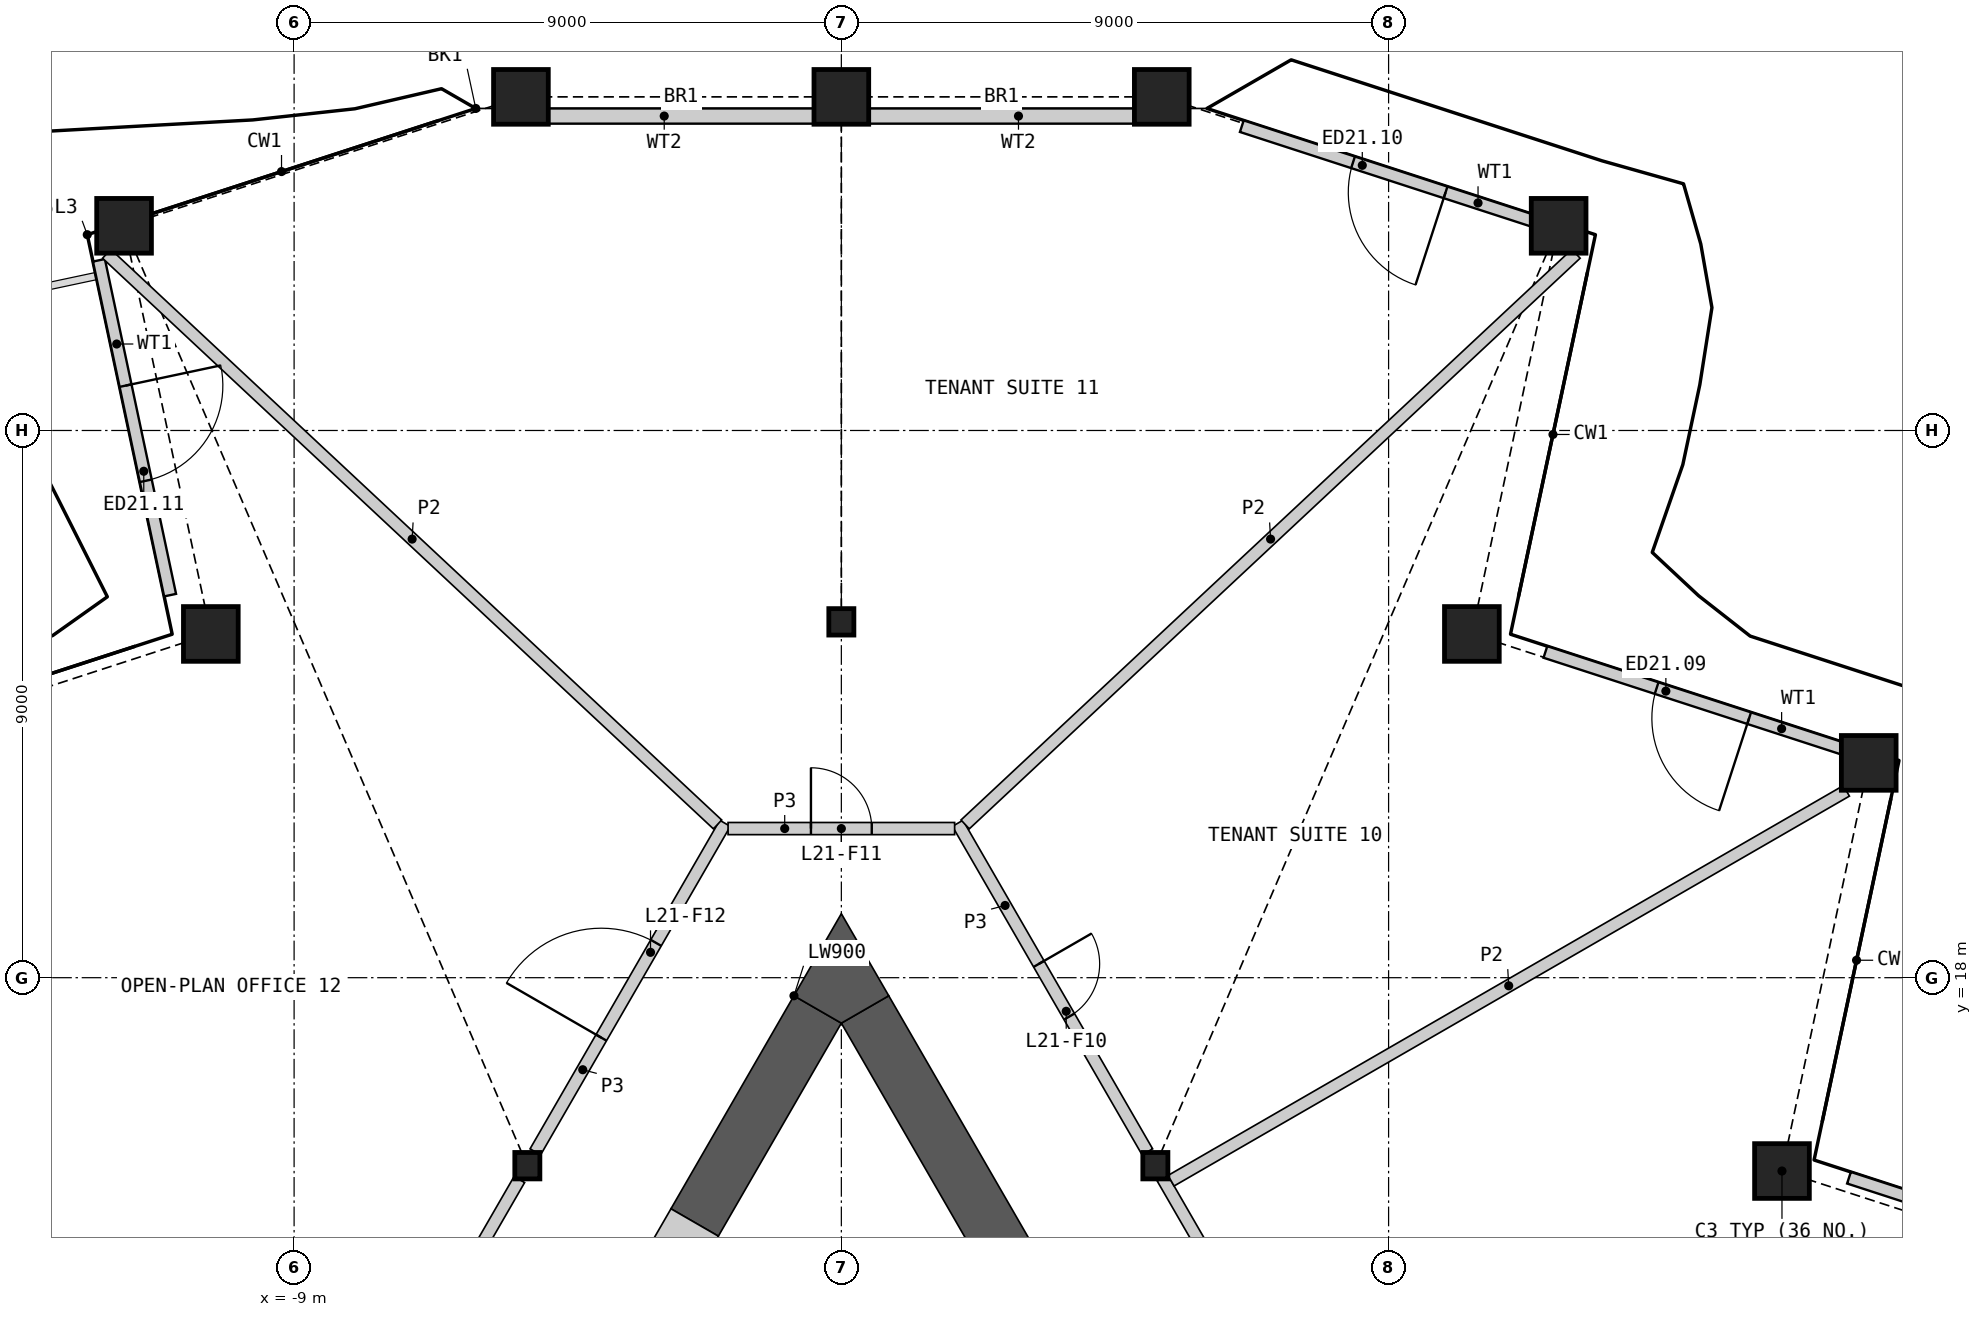
"""IFC4 building model, lengths in metres.
Left out: names, types, materials, properties, quantities, classifications, styles, units other than length and angle.
Written with IfcOpenShell. Run it as: python <this file> out.ifc"""

import sys

from ifc_helpers import new_model, si_unit, direction, frame, frame_2d, origin, origin_2d, place, context, subcontext, project, spatial, polyline, rectangle, hollow_rectangle, i_section, outline, extrude, element, fill, save


model = new_model("IFC4")
c1 = context("Model", 3, precision=1e-05, world=origin(), true_north=direction((0.0, 1.0)))
c2 = subcontext(c1, "Body", "Model", "MODEL_VIEW")
j1 = project(units=[si_unit("LENGTHUNIT", "METRE"), si_unit("PLANEANGLEUNIT", "RADIAN")], contexts=[c1])
p1 = place(None, origin())
s1 = spatial("IfcSite", under=j1, at=p1, CompositionType="ELEMENT")
p2 = place(p1, origin())
s2 = spatial("IfcBuilding", under=s1, at=p2, CompositionType="ELEMENT")
p3 = place(p2, frame((0.0, 0.0, 103.8)))
s3 = spatial("IfcBuildingStorey", under=s2, at=p3, CompositionType="ELEMENT", Elevation=103.8)
for number, where, z_axis, x_axis in (
    (1, (15.469, 14.82, 0.0), (0.0, 0.0, 1.0), (1.0, 0.0, 0.0)),
    (2, (16.896, 21.533, 0.0), (0.0, 0.0, 1.0), (1.0, 0.0, 0.0)),
    (3, (10.37, 23.654, 0.0), (0.0, 0.0, 1.0), (1.0, 0.0, 0.0)),
    (4, (11.796, 30.366, 0.0), (0.0, 0.0, 1.0), (1.0, 0.0, 0.0)),
    (5, (5.27, 32.487, 0.0), (0.0, 0.0, 1.0), (1.0, 0.0, 0.0)),
    (6, (0.0, 32.487, 0.0), (0.0, 0.0, 1.0), (1.0, 0.0, 0.0)),
    (7, (-5.27, 32.487, 0.0), (0.0, 0.0, 1.0), (1.0, 0.0, 0.0)),
    (8, (-11.796, 30.366, 0.0), (0.0, 0.0, 1.0), (1.0, 0.0, 0.0)),
    (9, (-10.37, 23.654, 0.0), (0.0, 0.0, 1.0), (1.0, 0.0, 0.0)),
):
    element("IfcColumn", number, at=place(p3, frame(where, z_axis=z_axis, x_axis=x_axis)), inside=s3, PredefinedType="COLUMN", context=c2, shape_type="SweptSolid", body=[
        extrude(hollow_rectangle(XDim=0.9, YDim=0.9, WallThickness=0.06, at=origin_2d()), origin(), (0.0, 0.0, 1.0), 4.2),
    ])
for number, where, z_axis, x_axis in (
    (10, (0.0, 23.853, 0.0), (0.0, 0.0, 1.0), (1.0, 0.0, 0.0)),
    (11, (-5.164, 14.908, 0.0), (0.0, 0.0, 1.0), (1.0, 0.0, 0.0)),
    (12, (5.164, 14.908, 0.0), (0.0, 0.0, 1.0), (1.0, 0.0, 0.0)),
):
    element("IfcColumn", number, at=place(p3, frame(where, z_axis=z_axis, x_axis=x_axis)), inside=s3, PredefinedType="COLUMN", context=c2, shape_type="SweptSolid", body=[
        extrude(i_section(OverallWidth=0.412, OverallDepth=0.435, WebThickness=0.036, FlangeThickness=0.057, at=origin_2d()), origin(), (0.0, 0.0, 1.0), 4.2),
    ])
p4 = place(p3, frame((21.751, 13.027, 0.0), z_axis=(0.0, 0.0, 1.0), x_axis=(-0.951049879841, 0.309037418534, 0.0)))
e13 = element("IfcWall", 13, at=p4, inside=s3, PredefinedType="SOLIDWALL", context=c2, shape_type="SweptSolid", body=[
    extrude(rectangle(XDim=5.446, YDim=0.2, at=frame_2d((2.723, 0.0))), origin(), (0.0, 0.0, 1.0), 3.189),
])
p5 = place(p4, frame((1.923, 0.0, 0.0)))
e14 = element("IfcOpeningElement", 14, at=p5, cuts=e13, PredefinedType="OPENING", context=c2, shape_type="SweptSolid", body=[
    extrude(rectangle(XDim=1.6, YDim=2.4, at=frame_2d((0.8, 1.2))), frame((0.0, 0.11, 0.0), z_axis=(0.0, -1.0, 0.0), x_axis=(1.0, 0.0, 0.0)), (0.0, 0.0, 1.0), 0.22),
])
p6 = place(p3, frame((16.759, 21.674, 0.0), z_axis=(0.0, 0.0, 1.0), x_axis=(-0.951049879841, 0.309037418534, 0.0)))
e15 = element("IfcWall", 15, at=p6, inside=s3, PredefinedType="SOLIDWALL", context=c2, shape_type="SweptSolid", body=[
    extrude(rectangle(XDim=5.446, YDim=0.2, at=frame_2d((2.723, 0.0))), origin(), (0.0, 0.0, 1.0), 3.189),
])
p7 = place(p6, frame((1.923, 0.0, 0.0)))
e16 = element("IfcOpeningElement", 16, at=p7, cuts=e15, PredefinedType="OPENING", context=c2, shape_type="SweptSolid", body=[
    extrude(rectangle(XDim=1.6, YDim=2.4, at=frame_2d((0.8, 1.2))), frame((0.0, 0.11, 0.0), z_axis=(0.0, -1.0, 0.0), x_axis=(1.0, 0.0, 0.0)), (0.0, 0.0, 1.0), 0.22),
])
p8 = place(p3, frame((11.766, 30.322, 0.0), z_axis=(0.0, 0.0, 1.0), x_axis=(-0.951049879841, 0.309037418534, 0.0)))
e17 = element("IfcWall", 17, at=p8, inside=s3, PredefinedType="SOLIDWALL", context=c2, shape_type="SweptSolid", body=[
    extrude(rectangle(XDim=5.446, YDim=0.2, at=frame_2d((2.723, 0.0))), origin(), (0.0, 0.0, 1.0), 3.189),
])
p9 = place(p8, frame((1.923, 0.0, 0.0)))
e18 = element("IfcOpeningElement", 18, at=p9, cuts=e17, PredefinedType="OPENING", context=c2, shape_type="SweptSolid", body=[
    extrude(rectangle(XDim=1.6, YDim=2.4, at=frame_2d((0.8, 1.2))), frame((0.0, 0.11, 0.0), z_axis=(0.0, -1.0, 0.0), x_axis=(1.0, 0.0, 0.0)), (0.0, 0.0, 1.0), 0.22),
])
for number, where, z_axis, x_axis in (
    (19, (5.376, 32.171, 0.0), (0.0, 0.0, 1.0), (-1.0, 0.0, 0.0)),
    (20, (-0.45, 32.171, 0.0), (0.0, 0.0, 1.0), (-1.0, 0.0, 0.0)),
):
    element("IfcWall", number, at=place(p3, frame(where, z_axis=z_axis, x_axis=x_axis)), inside=s3, PredefinedType="SOLIDWALL", context=c2, shape_type="SweptSolid", body=[
        extrude(rectangle(XDim=4.926, YDim=0.25, at=frame_2d((2.463, 0.0))), origin(), (0.0, 0.0, 1.0), 3.189),
    ])
p10 = place(p3, frame((-12.21, 29.799, 0.0), z_axis=(0.0, 0.0, 1.0), x_axis=(0.207917875772, -0.978146286061, 0.0)))
e21 = element("IfcWall", 21, at=p10, inside=s3, PredefinedType="SOLIDWALL", context=c2, shape_type="SweptSolid", body=[
    extrude(rectangle(XDim=5.63, YDim=0.2, at=frame_2d((2.815, 0.0))), origin(), (0.0, 0.0, 1.0), 3.189),
])
p11 = place(p10, frame((2.107, 0.0, 0.0)))
e22 = element("IfcOpeningElement", 22, at=p11, cuts=e21, PredefinedType="OPENING", context=c2, shape_type="SweptSolid", body=[
    extrude(rectangle(XDim=1.6, YDim=2.4, at=frame_2d((0.8, 1.2))), frame((0.0, 0.11, 0.0), z_axis=(0.0, -1.0, 0.0), x_axis=(1.0, 0.0, 0.0)), (0.0, 0.0, 1.0), 0.22),
])
p12 = place(p3, frame((4.296, 10.712, 0.0), z_axis=(0.0, 0.0, 1.0), x_axis=(-0.500011000363, 0.866019052629, 0.0)))
e23 = element("IfcWall", 23, at=p12, inside=s3, PredefinedType="SHEAR", context=c2, shape_type="SweptSolid", body=[
    extrude(rectangle(XDim=7.812, YDim=0.9, at=frame_2d((3.906, 0.0))), origin(), (0.0, 0.0, 1.0), 3.8),
])
p13 = place(p3, frame((-0.39, 17.478, 0.0), z_axis=(0.0, 0.0, 1.0), x_axis=(-0.500046330384, -0.865998653272, 0.0)))
e24 = element("IfcWall", 24, at=p13, inside=s3, PredefinedType="SHEAR", context=c2, shape_type="SweptSolid", body=[
    extrude(rectangle(XDim=4.045, YDim=0.9, at=frame_2d((2.023, 0.0))), origin(), (0.0, 0.0, 1.0), 3.8),
])
p14 = place(p3, origin())
e25 = element("IfcWall", 25, at=p14, inside=s3, PredefinedType="SHEAR", context=c2, shape_type="SweptSolid", body=[
    extrude(outline(polyline([(-0.779, 17.703), (0.0, 19.052), (0.779, 17.703), (0.0, 17.253), (-0.779, 17.703)])), origin(), (0.0, 0.0, 1.0), 3.8),
])
p15 = place(p3, frame((-2.413, 13.974, 0.0), z_axis=(0.0, 0.0, 1.0), x_axis=(-0.499946605688, -0.86605622881, 0.0)))
e26 = element("IfcWall", 26, at=p15, inside=s3, PredefinedType="SHEAR", context=c2, shape_type="SweptSolid", body=[
    extrude(rectangle(XDim=2.2, YDim=0.9, at=frame_2d((1.1, 0.0))), origin(), (0.0, 0.0, 1.0), 3.8),
])
p16 = place(p15, frame((0.6, 0.0, 0.0)))
e27 = element("IfcOpeningElement", 27, at=p16, cuts=e26, PredefinedType="OPENING", context=c2, shape_type="SweptSolid", body=[
    extrude(rectangle(XDim=1.0, YDim=2.1, at=frame_2d((0.5, 1.05))), frame((0.0, 0.46, 0.0), z_axis=(0.0, -1.0, 0.0), x_axis=(1.0, 0.0, 0.0)), (0.0, 0.0, 1.0), 0.92),
])
p17 = place(p3, frame((-10.197, 6.19, 0.0), z_axis=(0.0, 0.0, 1.0), x_axis=(0.500012035596, 0.866018454918, 0.0)))
e28 = element("IfcWall", 28, at=p17, inside=s3, PredefinedType="PARTITIONING", context=c2, shape_type="SweptSolid", body=[
    extrude(rectangle(XDim=9.803, YDim=0.2, at=frame_2d((4.902, 0.0))), origin(), (0.0, 0.0, 1.0), 3.8),
])
p18 = place(p3, frame((5.281, 14.706, 0.0), z_axis=(0.0, 0.0, 1.0), x_axis=(0.500000421045, -0.866025160694, 0.0)))
e29 = element("IfcWall", 29, at=p18, inside=s3, PredefinedType="PARTITIONING", context=c2, shape_type="SweptSolid", body=[
    extrude(rectangle(XDim=9.833, YDim=0.2, at=frame_2d((4.917, 0.0))), origin(), (0.0, 0.0, 1.0), 3.8),
])
p19 = place(p18, frame((4.467, 0.0, 0.0)))
e30 = element("IfcOpeningElement", 30, at=p19, cuts=e29, PredefinedType="OPENING", context=c2, shape_type="SweptSolid", body=[
    extrude(rectangle(XDim=1.0, YDim=2.1, at=frame_2d((0.5, 1.05))), frame((0.0, 0.11, 0.0), z_axis=(0.0, -1.0, 0.0), x_axis=(1.0, 0.0, 0.0)), (0.0, 0.0, 1.0), 0.22),
])
p20 = place(p3, frame((-5.033, 15.135, 0.0), z_axis=(0.0, 0.0, 1.0), x_axis=(0.499980978912, 0.866036385336, 0.0)))
e31 = element("IfcWall", 31, at=p20, inside=s3, PredefinedType="PARTITIONING", context=c2, shape_type="SweptSolid", body=[
    extrude(rectangle(XDim=6.24, YDim=0.2, at=frame_2d((3.12, 0.0))), origin(), (0.0, 0.0, 1.0), 3.8),
])
p21 = place(p20, frame((2.169, 0.0, 0.0)))
e32 = element("IfcOpeningElement", 32, at=p21, cuts=e31, PredefinedType="OPENING", context=c2, shape_type="SweptSolid", body=[
    extrude(rectangle(XDim=1.8, YDim=2.1, at=frame_2d((0.9, 1.05))), frame((0.0, 0.11, 0.0), z_axis=(0.0, -1.0, 0.0), x_axis=(1.0, 0.0, 0.0)), (0.0, 0.0, 1.0), 0.22),
])
p22 = place(p3, frame((1.913, 20.539, 0.0), z_axis=(0.0, 0.0, 1.0), x_axis=(0.499980978912, -0.866036385336, 0.0)))
e33 = element("IfcWall", 33, at=p22, inside=s3, PredefinedType="PARTITIONING", context=c2, shape_type="SweptSolid", body=[
    extrude(rectangle(XDim=6.24, YDim=0.2, at=frame_2d((3.12, 0.0))), origin(), (0.0, 0.0, 1.0), 3.8),
])
p23 = place(p22, frame((2.67, 0.0, 0.0)))
e34 = element("IfcOpeningElement", 34, at=p23, cuts=e33, PredefinedType="OPENING", context=c2, shape_type="SweptSolid", body=[
    extrude(rectangle(XDim=1.0, YDim=2.1, at=frame_2d((0.5, 1.05))), frame((0.0, 0.11, 0.0), z_axis=(0.0, -1.0, 0.0), x_axis=(1.0, 0.0, 0.0)), (0.0, 0.0, 1.0), 0.22),
])
p24 = place(p3, frame((-1.863, 20.453, 0.0), z_axis=(0.0, 0.0, 1.0), x_axis=(1.0, 0.0, 0.0)))
e35 = element("IfcWall", 35, at=p24, inside=s3, PredefinedType="PARTITIONING", context=c2, shape_type="SweptSolid", body=[
    extrude(rectangle(XDim=3.726, YDim=0.2, at=frame_2d((1.863, 0.0))), origin(), (0.0, 0.0, 1.0), 3.8),
])
p25 = place(p24, frame((1.363, 0.0, 0.0)))
e36 = element("IfcOpeningElement", 36, at=p25, cuts=e35, PredefinedType="OPENING", context=c2, shape_type="SweptSolid", body=[
    extrude(rectangle(XDim=1.0, YDim=2.1, at=frame_2d((0.5, 1.05))), frame((0.0, 0.11, 0.0), z_axis=(0.0, -1.0, 0.0), x_axis=(1.0, 0.0, 0.0)), (0.0, 0.0, 1.0), 0.22),
])
for number, where, z_axis, x_axis in (
    (37, (2.036, 20.521, 0.0), (0.0, 0.0, 1.0), (0.731, 0.683, 0.0)),
    (38, (-12.082, 29.906, 0.0), (0.0, 0.0, 1.0), (0.731, -0.683, 0.0)),
):
    element("IfcWall", number, at=place(p3, frame(where, z_axis=z_axis, x_axis=x_axis)), inside=s3, PredefinedType="PARTITIONING", context=c2, shape_type="SweptSolid", body=[
        extrude(rectangle(XDim=13.748, YDim=0.2, at=frame_2d((6.874, 0.0))), origin(), (0.0, 0.0, 1.0), 2.885),
    ])
p26 = place(p3, frame((5.422, 14.661, 0.0), z_axis=(0.0, 0.0, 1.0), x_axis=(0.866023907196, 0.500002592159, 0.0)))
e39 = element("IfcWall", 39, at=p26, inside=s3, PredefinedType="PARTITIONING", context=c2, shape_type="SweptSolid", body=[
    extrude(rectangle(XDim=12.825, YDim=0.2, at=frame_2d((6.412, 0.0))), origin(), (0.0, 0.0, 1.0), 2.885),
])
p27 = place(p3, frame((-15.01, 14.431, 0.0), z_axis=(0.0, 0.0, 1.0), x_axis=(0.866019738461, -0.5000098125, 0.0)))
e40 = element("IfcWall", 40, at=p27, inside=s3, PredefinedType="PARTITIONING", context=c2, shape_type="SweptSolid", body=[
    extrude(rectangle(XDim=8.188, YDim=0.2, at=frame_2d((4.094, 0.0))), origin(), (0.0, 0.0, 1.0), 2.885),
])
p28 = place(p7, origin())
e41 = element("IfcDoor", 41, at=p28, inside=s3, OperationType="DOUBLE_DOOR_SINGLE_SWING", PredefinedType="DOOR", context=c2, shape_type="SweptSolid", body=[
    extrude(rectangle(XDim=1.6, YDim=2.4, at=frame_2d((0.8, 1.2))), frame((0.0, 0.025, 0.0), z_axis=(0.0, -1.0, 0.0), x_axis=(1.0, 0.0, 0.0)), (0.0, 0.0, 1.0), 0.05),
])
fill(e16, e41)
p29 = place(p9, origin())
e42 = element("IfcDoor", 42, at=p29, inside=s3, OperationType="DOUBLE_DOOR_SINGLE_SWING", PredefinedType="DOOR", context=c2, shape_type="SweptSolid", body=[
    extrude(rectangle(XDim=1.6, YDim=2.4, at=frame_2d((0.8, 1.2))), frame((0.0, 0.025, 0.0), z_axis=(0.0, -1.0, 0.0), x_axis=(1.0, 0.0, 0.0)), (0.0, 0.0, 1.0), 0.05),
])
fill(e18, e42)
p30 = place(p11, origin())
e43 = element("IfcDoor", 43, at=p30, inside=s3, OperationType="DOUBLE_DOOR_SINGLE_SWING", PredefinedType="DOOR", context=c2, shape_type="SweptSolid", body=[
    extrude(rectangle(XDim=1.6, YDim=2.4, at=frame_2d((0.8, 1.2))), frame((0.0, 0.025, 0.0), z_axis=(0.0, -1.0, 0.0), x_axis=(1.0, 0.0, 0.0)), (0.0, 0.0, 1.0), 0.05),
])
fill(e22, e43)
p31 = place(p23, origin())
e44 = element("IfcDoor", 44, at=p31, inside=s3, OperationType="SINGLE_SWING_LEFT", PredefinedType="DOOR", context=c2, shape_type="SweptSolid", body=[
    extrude(rectangle(XDim=1.0, YDim=2.1, at=frame_2d((0.5, 1.05))), frame((0.0, 0.025, 0.0), z_axis=(0.0, -1.0, 0.0), x_axis=(1.0, 0.0, 0.0)), (0.0, 0.0, 1.0), 0.05),
])
fill(e34, e44)
p32 = place(p25, origin())
e45 = element("IfcDoor", 45, at=p32, inside=s3, OperationType="SINGLE_SWING_LEFT", PredefinedType="DOOR", context=c2, shape_type="SweptSolid", body=[
    extrude(rectangle(XDim=1.0, YDim=2.1, at=frame_2d((0.5, 1.05))), frame((0.0, 0.025, 0.0), z_axis=(0.0, -1.0, 0.0), x_axis=(1.0, 0.0, 0.0)), (0.0, 0.0, 1.0), 0.05),
])
fill(e36, e45)
p33 = place(p21, origin())
e46 = element("IfcDoor", 46, at=p33, inside=s3, OperationType="DOUBLE_DOOR_SINGLE_SWING", PredefinedType="DOOR", context=c2, shape_type="SweptSolid", body=[
    extrude(rectangle(XDim=1.8, YDim=2.1, at=frame_2d((0.9, 1.05))), frame((0.0, 0.025, 0.0), z_axis=(0.0, -1.0, 0.0), x_axis=(1.0, 0.0, 0.0)), (0.0, 0.0, 1.0), 0.05),
])
fill(e32, e46)
save(model, sys.argv[1])
